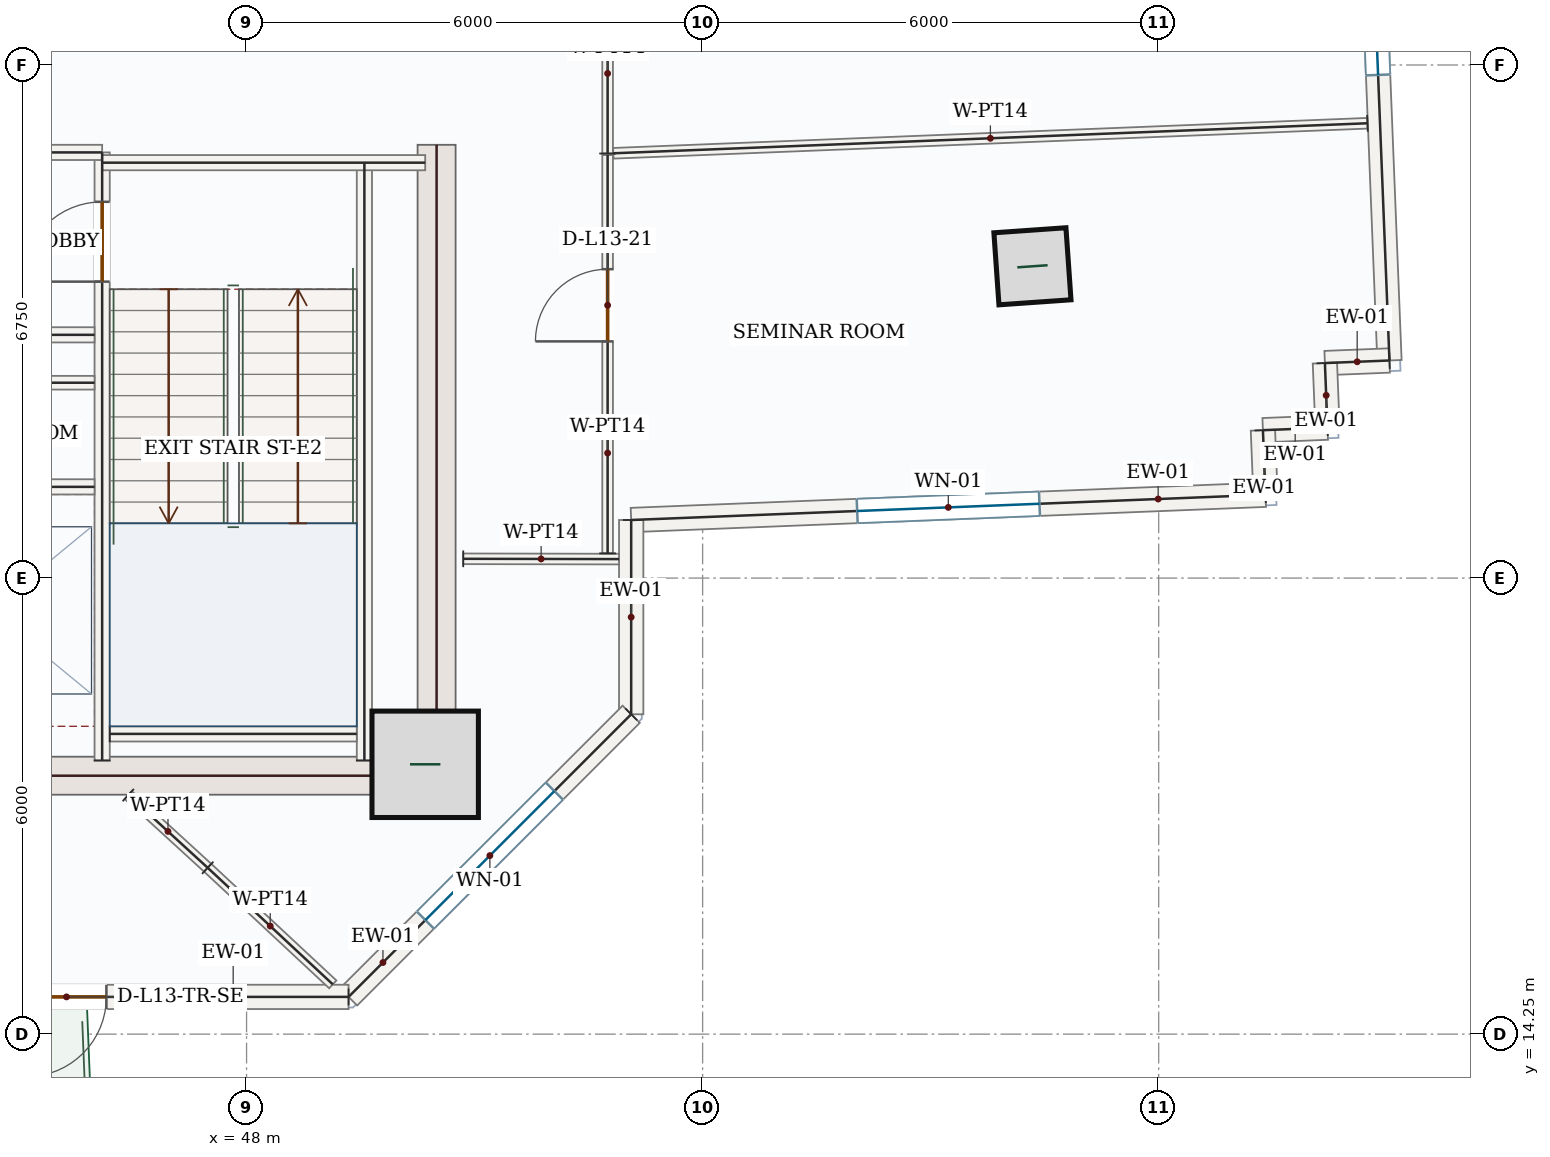
"""IFC4 building model, lengths in metres.
Left out: names, types, materials, properties, quantities, classifications, styles, units other than length and angle.
Written with IfcOpenShell. Run it as: python <this file> out.ifc"""

import sys

from ifc_helpers import new_model, si_unit, direction, frame, frame_2d, origin, origin_2d, place, context, subcontext, project, spatial, rectangle, hollow_rectangle, extrude, source, transform, mapped, element, fill, save


model = new_model("IFC4")
c1 = context("Model", 3, precision=1e-05, world=origin(), true_north=direction((0.0, 1.0)))
c2 = subcontext(c1, "Body", "Model", "MODEL_VIEW")
j1 = project(units=[si_unit("LENGTHUNIT", "METRE"), si_unit("PLANEANGLEUNIT", "RADIAN")], contexts=[c1])
p1 = place(None, origin())
s1 = spatial("IfcSite", under=j1, at=p1, CompositionType="ELEMENT")
p2 = place(p1, origin())
s2 = spatial("IfcBuilding", under=s1, at=p2, CompositionType="ELEMENT")
p3 = place(p2, frame((0.0, 0.0, 62.7)))
s3 = spatial("IfcBuildingStorey", under=s2, at=p3, CompositionType="ELEMENT", Elevation=62.7)
m1 = source(origin(), c2, "Body", "SweptSolid", [
    extrude(rectangle(XDim=8.55, YDim=0.5, at=frame_2d((4.275, 0.0))), origin(), (0.0, 0.0, 1.0), 3.95),
])
p4 = place(p3, frame((50.5, 17.4, 0.0), z_axis=(0.0, 0.0, 1.0), x_axis=(0.0, 1.0, 0.0)))
e1 = element("IfcWall", 1, at=p4, inside=s3, PredefinedType="SHEAR", context=c2, shape_type="MappedRepresentation", body=[
    mapped(m1, transform((0.0, 0.0, 0.0), x_axis=(1.0, 0.0, 0.0), y_axis=(0.0, 1.0, 0.0), z_axis=(0.0, 0.0, 1.0), scale=1.0)),
])
m2 = source(origin(), c2, "Body", "SweptSolid", [
    extrude(rectangle(XDim=7.0, YDim=0.5, at=frame_2d((3.5, 0.0))), origin(), (0.0, 0.0, 1.0), 3.95),
])
p5 = place(p3, frame((43.25, 17.65, 0.0), z_axis=(0.0, 0.0, 1.0), x_axis=(1.0, 0.0, 0.0)))
e2 = element("IfcWall", 2, at=p5, inside=s3, PredefinedType="SHEAR", context=c2, shape_type="MappedRepresentation", body=[
    mapped(m2, transform((0.0, 0.0, 0.0), x_axis=(1.0, 0.0, 0.0), y_axis=(0.0, 1.0, 0.0), z_axis=(0.0, 0.0, 1.0), scale=1.0)),
])
m3 = source(origin(), c2, "Body", "SweptSolid", [
    extrude(rectangle(XDim=1.4, YDim=1.4, at=origin_2d()), origin(), (0.0, 0.0, 1.0), 4.2),
])
p6 = place(p3, frame((50.35, 17.8, 0.0), z_axis=(0.0, 0.0, 1.0), x_axis=(1.0, 0.0, 0.0)))
e3 = element("IfcColumn", 3, at=p6, inside=s3, PredefinedType="COLUMN", context=c2, shape_type="MappedRepresentation", body=[
    mapped(m3, transform((0.0, 0.0, 0.0), x_axis=(1.0, 0.0, 0.0), y_axis=(0.0, 1.0, 0.0), z_axis=(0.0, 0.0, 1.0), scale=1.0)),
])
m4 = source(origin(), c2, "Body", "SweptSolid", [
    extrude(hollow_rectangle(XDim=0.95, YDim=0.95, WallThickness=0.05, at=origin_2d()), origin(), (0.0, 0.0, 1.0), 4.2),
])
p7 = place(p3, frame((58.339, 24.352, 0.0), z_axis=(0.0, 0.0, 1.0), x_axis=(0.99756405026, 0.069756473744, 0.0)))
e4 = element("IfcColumn", 4, at=p7, inside=s3, PredefinedType="COLUMN", context=c2, shape_type="MappedRepresentation", body=[
    mapped(m4, transform((0.0, 0.0, 0.0), x_axis=(1.0, 0.0, 0.0), y_axis=(0.0, 1.0, 0.0), z_axis=(0.0, 0.0, 1.0), scale=1.0)),
])
p8 = place(p3, frame((62.641, 33.025, 0.0), z_axis=(0.0, 0.0, 1.0), x_axis=(0.03977146366, -0.999208802342, 0.0)))
e5 = element("IfcWall", 5, at=p8, inside=s3, PredefinedType="SOLIDWALL", context=c2, shape_type="SweptSolid", body=[
    extrude(rectangle(XDim=9.92, YDim=0.32, at=frame_2d((4.96, 0.0))), origin(), (0.0, 0.0, 1.0), 3.95),
])
p9 = place(p8, frame((3.76, 0.0, 0.85)))
e6 = element("IfcOpeningElement", 6, at=p9, cuts=e5, PredefinedType="OPENING", context=c2, shape_type="SweptSolid", body=[
    extrude(rectangle(XDim=2.4, YDim=1.8, at=frame_2d((1.2, 0.9))), frame((0.0, 0.17, 0.0), z_axis=(0.0, -1.0, 0.0), x_axis=(1.0, 0.0, 0.0)), (0.0, 0.0, 1.0), 0.34),
])
m5 = source(origin(), c2, "Body", "SweptSolid", [
    extrude(rectangle(XDim=0.85, YDim=0.32, at=frame_2d((0.425, 0.0))), origin(), (0.0, 0.0, 1.0), 3.95),
])
p10 = place(p3, frame((63.036, 23.113, 0.0), z_axis=(0.0, 0.0, 1.0), x_axis=(-0.999202334929, -0.039933618331, 0.0)))
e7 = element("IfcWall", 7, at=p10, inside=s3, PredefinedType="SOLIDWALL", context=c2, shape_type="MappedRepresentation", body=[
    mapped(m5, transform((0.0, 0.0, 0.0), x_axis=(1.0, 0.0, 0.0), y_axis=(0.0, 1.0, 0.0), z_axis=(0.0, 0.0, 1.0), scale=1.0)),
])
m6 = source(origin(), c2, "Body", "SweptSolid", [
    extrude(rectangle(XDim=0.85, YDim=0.32, at=frame_2d((0.425, 0.0))), origin(), (0.0, 0.0, 1.0), 3.95),
])
for number, where, z_axis, x_axis in (
    (8, (62.187, 23.079, 0.0), (0.0, 0.0, 1.0), (0.04, -0.999, 0.0)),
    (9, (62.22, 22.229, 0.0), (0.0, 0.0, 1.0), (-0.999, -0.04, 0.0)),
    (10, (61.371, 22.196, 0.0), (0.0, 0.0, 1.0), (0.04, -0.999, 0.0)),
):
    element("IfcWall", number, at=place(p3, frame(where, z_axis=z_axis, x_axis=x_axis)), inside=s3, PredefinedType="SOLIDWALL", context=c2, shape_type="MappedRepresentation", body=[
        mapped(m6, transform((0.0, 0.0, 0.0), x_axis=(1.0, 0.0, 0.0), y_axis=(0.0, 1.0, 0.0), z_axis=(0.0, 0.0, 1.0), scale=1.0)),
    ])
p11 = place(p3, frame((61.405, 21.346, 0.0), z_axis=(0.0, 0.0, 1.0), x_axis=(-0.999208226989, -0.039785916063, 0.0)))
e11 = element("IfcWall", 11, at=p11, inside=s3, PredefinedType="SOLIDWALL", context=c2, shape_type="SweptSolid", body=[
    extrude(rectangle(XDim=8.352, YDim=0.32, at=frame_2d((4.176, 0.0))), origin(), (0.0, 0.0, 1.0), 3.95),
])
p12 = place(p11, frame((2.976, 0.0, 0.85)))
e12 = element("IfcOpeningElement", 12, at=p12, cuts=e11, PredefinedType="OPENING", context=c2, shape_type="SweptSolid", body=[
    extrude(rectangle(XDim=2.4, YDim=1.8, at=frame_2d((1.2, 0.9))), frame((0.0, 0.17, 0.0), z_axis=(0.0, -1.0, 0.0), x_axis=(1.0, 0.0, 0.0)), (0.0, 0.0, 1.0), 0.34),
])
m7 = source(origin(), c2, "Body", "SweptSolid", [
    extrude(rectangle(XDim=2.556, YDim=0.32, at=frame_2d((1.278, 0.0))), origin(), (0.0, 0.0, 1.0), 3.95),
])
p13 = place(p3, frame((53.06, 21.014, 0.0), z_axis=(0.0, 0.0, 1.0), x_axis=(0.0, -1.0, 0.0)))
e13 = element("IfcWall", 13, at=p13, inside=s3, PredefinedType="SOLIDWALL", context=c2, shape_type="MappedRepresentation", body=[
    mapped(m7, transform((0.0, 0.0, 0.0), x_axis=(1.0, 0.0, 0.0), y_axis=(0.0, 1.0, 0.0), z_axis=(0.0, 0.0, 1.0), scale=1.0)),
])
p14 = place(p3, frame((53.06, 18.458, 0.0), z_axis=(0.0, 0.0, 1.0), x_axis=(-0.707106781187, -0.707106781187, 0.0)))
e14 = element("IfcWall", 14, at=p14, inside=s3, PredefinedType="SOLIDWALL", context=c2, shape_type="SweptSolid", body=[
    extrude(rectangle(XDim=5.258, YDim=0.32, at=frame_2d((2.629, 0.0))), origin(), (0.0, 0.0, 1.0), 3.95),
])
p15 = place(p14, frame((1.429, 0.0, 0.85)))
e15 = element("IfcOpeningElement", 15, at=p15, cuts=e14, PredefinedType="OPENING", context=c2, shape_type="SweptSolid", body=[
    extrude(rectangle(XDim=2.4, YDim=1.8, at=frame_2d((1.2, 0.9))), frame((0.0, 0.17, 0.0), z_axis=(0.0, -1.0, 0.0), x_axis=(1.0, 0.0, 0.0)), (0.0, 0.0, 1.0), 0.34),
])
p16 = place(p3, frame((49.342, 14.74, 0.0), z_axis=(0.0, 0.0, 1.0), x_axis=(-1.0, 0.0, 0.0)))
e16 = element("IfcWall", 16, at=p16, inside=s3, PredefinedType="SOLIDWALL", context=c2, shape_type="SweptSolid", body=[
    extrude(rectangle(XDim=6.189, YDim=0.32, at=frame_2d((3.094, 0.0))), origin(), (0.0, 0.0, 1.0), 3.95),
])
p17 = place(p16, frame((3.186, 0.0, 0.0)))
e17 = element("IfcOpeningElement", 17, at=p17, cuts=e16, PredefinedType="OPENING", context=c2, shape_type="SweptSolid", body=[
    extrude(rectangle(XDim=1.05, YDim=2.15, at=frame_2d((0.525, 1.075))), frame((0.0, 0.17, 0.0), z_axis=(0.0, -1.0, 0.0), x_axis=(1.0, 0.0, 0.0)), (0.0, 0.0, 1.0), 0.34),
])
m8 = source(origin(), c2, "Body", "SweptSolid", [
    extrude(rectangle(XDim=7.87, YDim=0.2, at=frame_2d((3.935, 0.0))), origin(), (0.0, 0.0, 1.0), 3.95),
])
p18 = place(p3, frame((49.55, 17.85, 0.0), z_axis=(0.0, 0.0, 1.0), x_axis=(0.0, 1.0, 0.0)))
e18 = element("IfcWall", 18, at=p18, inside=s3, PredefinedType="SOLIDWALL", context=c2, shape_type="MappedRepresentation", body=[
    mapped(m8, transform((0.0, 0.0, 0.0), x_axis=(1.0, 0.0, 0.0), y_axis=(0.0, 1.0, 0.0), z_axis=(0.0, 0.0, 1.0), scale=1.0)),
])
p19 = place(p3, frame((46.1, 17.85, 0.0), z_axis=(0.0, 0.0, 1.0), x_axis=(0.0, 1.0, 0.0)))
e19 = element("IfcWall", 19, at=p19, inside=s3, PredefinedType="SOLIDWALL", context=c2, shape_type="SweptSolid", body=[
    extrude(rectangle(XDim=8.0, YDim=0.2, at=frame_2d((4.0, 0.0))), origin(), (0.0, 0.0, 1.0), 3.95),
])
p20 = place(p19, frame((6.3, 0.0, 0.0)))
e20 = element("IfcOpeningElement", 20, at=p20, cuts=e19, PredefinedType="OPENING", context=c2, shape_type="SweptSolid", body=[
    extrude(rectangle(XDim=1.05, YDim=2.15, at=frame_2d((0.525, 1.075))), frame((0.0, 0.11, 0.0), z_axis=(0.0, -1.0, 0.0), x_axis=(1.0, 0.0, 0.0)), (0.0, 0.0, 1.0), 0.22),
])
m9 = source(origin(), c2, "Body", "SweptSolid", [
    extrude(rectangle(XDim=3.0, YDim=0.2, at=frame_2d((1.5, 0.0))), origin(), (0.0, 0.0, 1.0), 3.95),
])
p21 = place(p3, frame((43.1, 25.85, 0.0), z_axis=(0.0, 0.0, 1.0), x_axis=(1.0, 0.0, 0.0)))
e21 = element("IfcWall", 21, at=p21, inside=s3, PredefinedType="SOLIDWALL", context=c2, shape_type="MappedRepresentation", body=[
    mapped(m9, transform((0.0, 0.0, 0.0), x_axis=(1.0, 0.0, 0.0), y_axis=(0.0, 1.0, 0.0), z_axis=(0.0, 0.0, 1.0), scale=1.0)),
])
m10 = source(origin(), c2, "Body", "SweptSolid", [
    extrude(rectangle(XDim=4.25, YDim=0.2, at=frame_2d((2.125, 0.0))), origin(), (0.0, 0.0, 1.0), 3.95),
])
p22 = place(p3, frame((46.1, 25.715, 0.0), z_axis=(0.0, 0.0, 1.0), x_axis=(1.0, 0.0, 0.0)))
e22 = element("IfcWall", 22, at=p22, inside=s3, PredefinedType="SOLIDWALL", context=c2, shape_type="MappedRepresentation", body=[
    mapped(m10, transform((0.0, 0.0, 0.0), x_axis=(1.0, 0.0, 0.0), y_axis=(0.0, 1.0, 0.0), z_axis=(0.0, 0.0, 1.0), scale=1.0)),
])
m11 = source(origin(), c2, "Body", "SweptSolid", [
    extrude(rectangle(XDim=3.25, YDim=0.2, at=frame_2d((1.625, 0.0))), origin(), (0.0, 0.0, 1.0), 3.95),
])
p23 = place(p3, frame((46.2, 18.2, 0.0), z_axis=(0.0, 0.0, 1.0), x_axis=(1.0, 0.0, 0.0)))
e23 = element("IfcWall", 23, at=p23, inside=s3, PredefinedType="SOLIDWALL", context=c2, shape_type="MappedRepresentation", body=[
    mapped(m11, transform((0.0, 0.0, 0.0), x_axis=(1.0, 0.0, 0.0), y_axis=(0.0, 1.0, 0.0), z_axis=(0.0, 0.0, 1.0), scale=1.0)),
])
m12 = source(origin(), c2, "Body", "SweptSolid", [
    extrude(rectangle(XDim=2.75, YDim=0.2, at=frame_2d((1.375, 0.0))), origin(), (0.0, 0.0, 1.0), 3.95),
])
for number, where, z_axis, x_axis in (
    (24, (43.25, 23.45, 0.0), (0.0, 0.0, 1.0), (1.0, 0.0, 0.0)),
    (25, (43.25, 21.45, 0.0), (0.0, 0.0, 1.0), (1.0, 0.0, 0.0)),
):
    element("IfcWall", number, at=place(p3, frame(where, z_axis=z_axis, x_axis=x_axis)), inside=s3, PredefinedType="SOLIDWALL", context=c2, shape_type="MappedRepresentation", body=[
        mapped(m12, transform((0.0, 0.0, 0.0), x_axis=(1.0, 0.0, 0.0), y_axis=(0.0, 1.0, 0.0), z_axis=(0.0, 0.0, 1.0), scale=1.0)),
    ])
m13 = source(origin(), c2, "Body", "SweptSolid", [
    extrude(rectangle(XDim=2.75, YDim=0.18, at=frame_2d((1.375, 0.0))), origin(), (0.0, 0.0, 1.0), 3.95),
])
p24 = place(p3, frame((43.25, 22.82, 0.0), z_axis=(0.0, 0.0, 1.0), x_axis=(1.0, 0.0, 0.0)))
e26 = element("IfcWall", 26, at=p24, inside=s3, PredefinedType="PARTITIONING", context=c2, shape_type="MappedRepresentation", body=[
    mapped(m13, transform((0.0, 0.0, 0.0), x_axis=(1.0, 0.0, 0.0), y_axis=(0.0, 1.0, 0.0), z_axis=(0.0, 0.0, 1.0), scale=1.0)),
])
p25 = place(p3, frame((52.75, 25.835, 0.0), z_axis=(0.0, 0.0, 1.0), x_axis=(0.0, 1.0, 0.0)))
e27 = element("IfcWall", 27, at=p25, inside=s3, PredefinedType="PARTITIONING", context=c2, shape_type="SweptSolid", body=[
    extrude(rectangle(XDim=3.843, YDim=0.14, at=frame_2d((1.921, 0.0))), origin(), (0.0, 0.0, 1.0), 3.95),
])
p26 = place(p25, frame((2.257, 0.0, 0.0)))
e28 = element("IfcOpeningElement", 28, at=p26, cuts=e27, PredefinedType="OPENING", context=c2, shape_type="SweptSolid", body=[
    extrude(rectangle(XDim=0.95, YDim=2.15, at=frame_2d((0.475, 1.075))), frame((0.0, 0.08, 0.0), z_axis=(0.0, -1.0, 0.0), x_axis=(1.0, 0.0, 0.0)), (0.0, 0.0, 1.0), 0.16),
])
m14 = source(origin(), c2, "Body", "SweptSolid", [
    extrude(rectangle(XDim=9.929, YDim=0.14, at=frame_2d((4.965, 0.0))), origin(), (0.0, 0.0, 1.0), 3.95),
])
p27 = place(p3, frame((62.747, 26.233, 0.0), z_axis=(0.0, 0.0, 1.0), x_axis=(-0.999208364847, -0.039782453661, 0.0)))
e29 = element("IfcWall", 29, at=p27, inside=s3, PredefinedType="PARTITIONING", context=c2, shape_type="MappedRepresentation", body=[
    mapped(m14, transform((0.0, 0.0, 0.0), x_axis=(1.0, 0.0, 0.0), y_axis=(0.0, 1.0, 0.0), z_axis=(0.0, 0.0, 1.0), scale=1.0)),
])
m15 = source(origin(), c2, "Body", "SweptSolid", [
    extrude(rectangle(XDim=1.417, YDim=0.14, at=frame_2d((0.708, 0.0))), origin(), (0.0, 0.0, 1.0), 3.95),
])
p28 = place(p3, frame((46.443, 17.395, 0.0), z_axis=(0.0, 0.0, 1.0), x_axis=(0.737776192982, -0.675045397784, 0.0)))
e30 = element("IfcWall", 30, at=p28, inside=s3, PredefinedType="PARTITIONING", context=c2, shape_type="MappedRepresentation", body=[
    mapped(m15, transform((0.0, 0.0, 0.0), x_axis=(1.0, 0.0, 0.0), y_axis=(0.0, 1.0, 0.0), z_axis=(0.0, 0.0, 1.0), scale=1.0)),
])
m16 = source(origin(), c2, "Body", "SweptSolid", [
    extrude(rectangle(XDim=2.25, YDim=0.14, at=frame_2d((1.125, 0.0))), origin(), (0.0, 0.0, 1.0), 3.95),
])
p29 = place(p3, frame((47.489, 16.439, 0.0), z_axis=(0.0, 0.0, 1.0), x_axis=(0.731524295554, -0.68181537458, 0.0)))
e31 = element("IfcWall", 31, at=p29, inside=s3, PredefinedType="PARTITIONING", context=c2, shape_type="MappedRepresentation", body=[
    mapped(m16, transform((0.0, 0.0, 0.0), x_axis=(1.0, 0.0, 0.0), y_axis=(0.0, 1.0, 0.0), z_axis=(0.0, 0.0, 1.0), scale=1.0)),
])
m17 = source(origin(), c2, "Body", "SweptSolid", [
    extrude(rectangle(XDim=2.049, YDim=0.14, at=frame_2d((1.025, 0.0))), origin(), (0.0, 0.0, 1.0), 3.95),
])
p30 = place(p3, frame((50.851, 20.503, 0.0), z_axis=(0.0, 0.0, 1.0), x_axis=(0.999998403336, -0.001786987854, 0.0)))
e32 = element("IfcWall", 32, at=p30, inside=s3, PredefinedType="PARTITIONING", context=c2, shape_type="MappedRepresentation", body=[
    mapped(m17, transform((0.0, 0.0, 0.0), x_axis=(1.0, 0.0, 0.0), y_axis=(0.0, 1.0, 0.0), z_axis=(0.0, 0.0, 1.0), scale=1.0)),
])
p31 = place(p3, frame((52.75, 20.575, 0.0), z_axis=(0.0, 0.0, 1.0), x_axis=(0.0, 1.0, 0.0)))
e33 = element("IfcWall", 33, at=p31, inside=s3, PredefinedType="PARTITIONING", context=c2, shape_type="SweptSolid", body=[
    extrude(rectangle(XDim=5.24, YDim=0.14, at=frame_2d((2.62, 0.0))), origin(), (0.0, 0.0, 1.0), 3.95),
])
p32 = place(p31, frame((2.789, 0.0, 0.0)))
e34 = element("IfcOpeningElement", 34, at=p32, cuts=e33, PredefinedType="OPENING", context=c2, shape_type="SweptSolid", body=[
    extrude(rectangle(XDim=0.95, YDim=2.15, at=frame_2d((0.475, 1.075))), frame((0.0, 0.08, 0.0), z_axis=(0.0, -1.0, 0.0), x_axis=(1.0, 0.0, 0.0)), (0.0, 0.0, 1.0), 0.16),
])
m18 = source(origin(), c2, "Body", "SweptSolid", [
    extrude(rectangle(XDim=2.4, YDim=1.8, at=frame_2d((1.2, 0.9))), frame((0.0, 0.03, 0.0), z_axis=(0.0, -1.0, 0.0), x_axis=(1.0, 0.0, 0.0)), (0.0, 0.0, 1.0), 0.06),
])
p33 = place(p9, origin())
e35 = element("IfcWindow", 35, at=p33, inside=s3, PartitioningType="DOUBLE_PANEL_VERTICAL", PredefinedType="WINDOW", context=c2, shape_type="MappedRepresentation", body=[
    mapped(m18, transform((0.0, 0.0, 0.0), x_axis=(1.0, 0.0, 0.0), y_axis=(0.0, 1.0, 0.0), z_axis=(0.0, 0.0, 1.0), scale=1.0)),
])
fill(e6, e35)
p34 = place(p12, origin())
e36 = element("IfcWindow", 36, at=p34, inside=s3, PartitioningType="DOUBLE_PANEL_VERTICAL", PredefinedType="WINDOW", context=c2, shape_type="MappedRepresentation", body=[
    mapped(m18, transform((0.0, 0.0, 0.0), x_axis=(1.0, 0.0, 0.0), y_axis=(0.0, 1.0, 0.0), z_axis=(0.0, 0.0, 1.0), scale=1.0)),
])
fill(e12, e36)
p35 = place(p15, origin())
e37 = element("IfcWindow", 37, at=p35, inside=s3, PartitioningType="DOUBLE_PANEL_VERTICAL", PredefinedType="WINDOW", context=c2, shape_type="MappedRepresentation", body=[
    mapped(m18, transform((0.0, 0.0, 0.0), x_axis=(1.0, 0.0, 0.0), y_axis=(0.0, 1.0, 0.0), z_axis=(0.0, 0.0, 1.0), scale=1.0)),
])
fill(e15, e37)
m19 = source(origin(), c2, "Body", "SweptSolid", [
    extrude(rectangle(XDim=1.05, YDim=2.15, at=frame_2d((0.525, 1.075))), frame((0.0, 0.025, 0.0), z_axis=(0.0, -1.0, 0.0), x_axis=(1.0, 0.0, 0.0)), (0.0, 0.0, 1.0), 0.05),
])
p36 = place(p17, origin())
e38 = element("IfcDoor", 38, at=p36, inside=s3, OperationType="SINGLE_SWING_RIGHT", PredefinedType="DOOR", context=c2, shape_type="MappedRepresentation", body=[
    mapped(m19, transform((0.0, 0.0, 0.0), x_axis=(1.0, 0.0, 0.0), y_axis=(0.0, 1.0, 0.0), z_axis=(0.0, 0.0, 1.0), scale=1.0)),
])
fill(e17, e38)
p37 = place(p20, origin())
e39 = element("IfcDoor", 39, at=p37, inside=s3, OperationType="SINGLE_SWING_LEFT", PredefinedType="DOOR", context=c2, shape_type="MappedRepresentation", body=[
    mapped(m19, transform((0.0, 0.0, 0.0), x_axis=(1.0, 0.0, 0.0), y_axis=(0.0, 1.0, 0.0), z_axis=(0.0, 0.0, 1.0), scale=1.0)),
])
fill(e20, e39)
m20 = source(origin(), c2, "Body", "SweptSolid", [
    extrude(rectangle(XDim=0.95, YDim=2.15, at=frame_2d((0.475, 1.075))), frame((0.0, 0.025, 0.0), z_axis=(0.0, -1.0, 0.0), x_axis=(1.0, 0.0, 0.0)), (0.0, 0.0, 1.0), 0.05),
])
p38 = place(p32, origin())
e40 = element("IfcDoor", 40, at=p38, inside=s3, OperationType="SINGLE_SWING_LEFT", PredefinedType="DOOR", context=c2, shape_type="MappedRepresentation", body=[
    mapped(m20, transform((0.0, 0.0, 0.0), x_axis=(1.0, 0.0, 0.0), y_axis=(0.0, 1.0, 0.0), z_axis=(0.0, 0.0, 1.0), scale=1.0)),
])
fill(e34, e40)
save(model, sys.argv[1])
